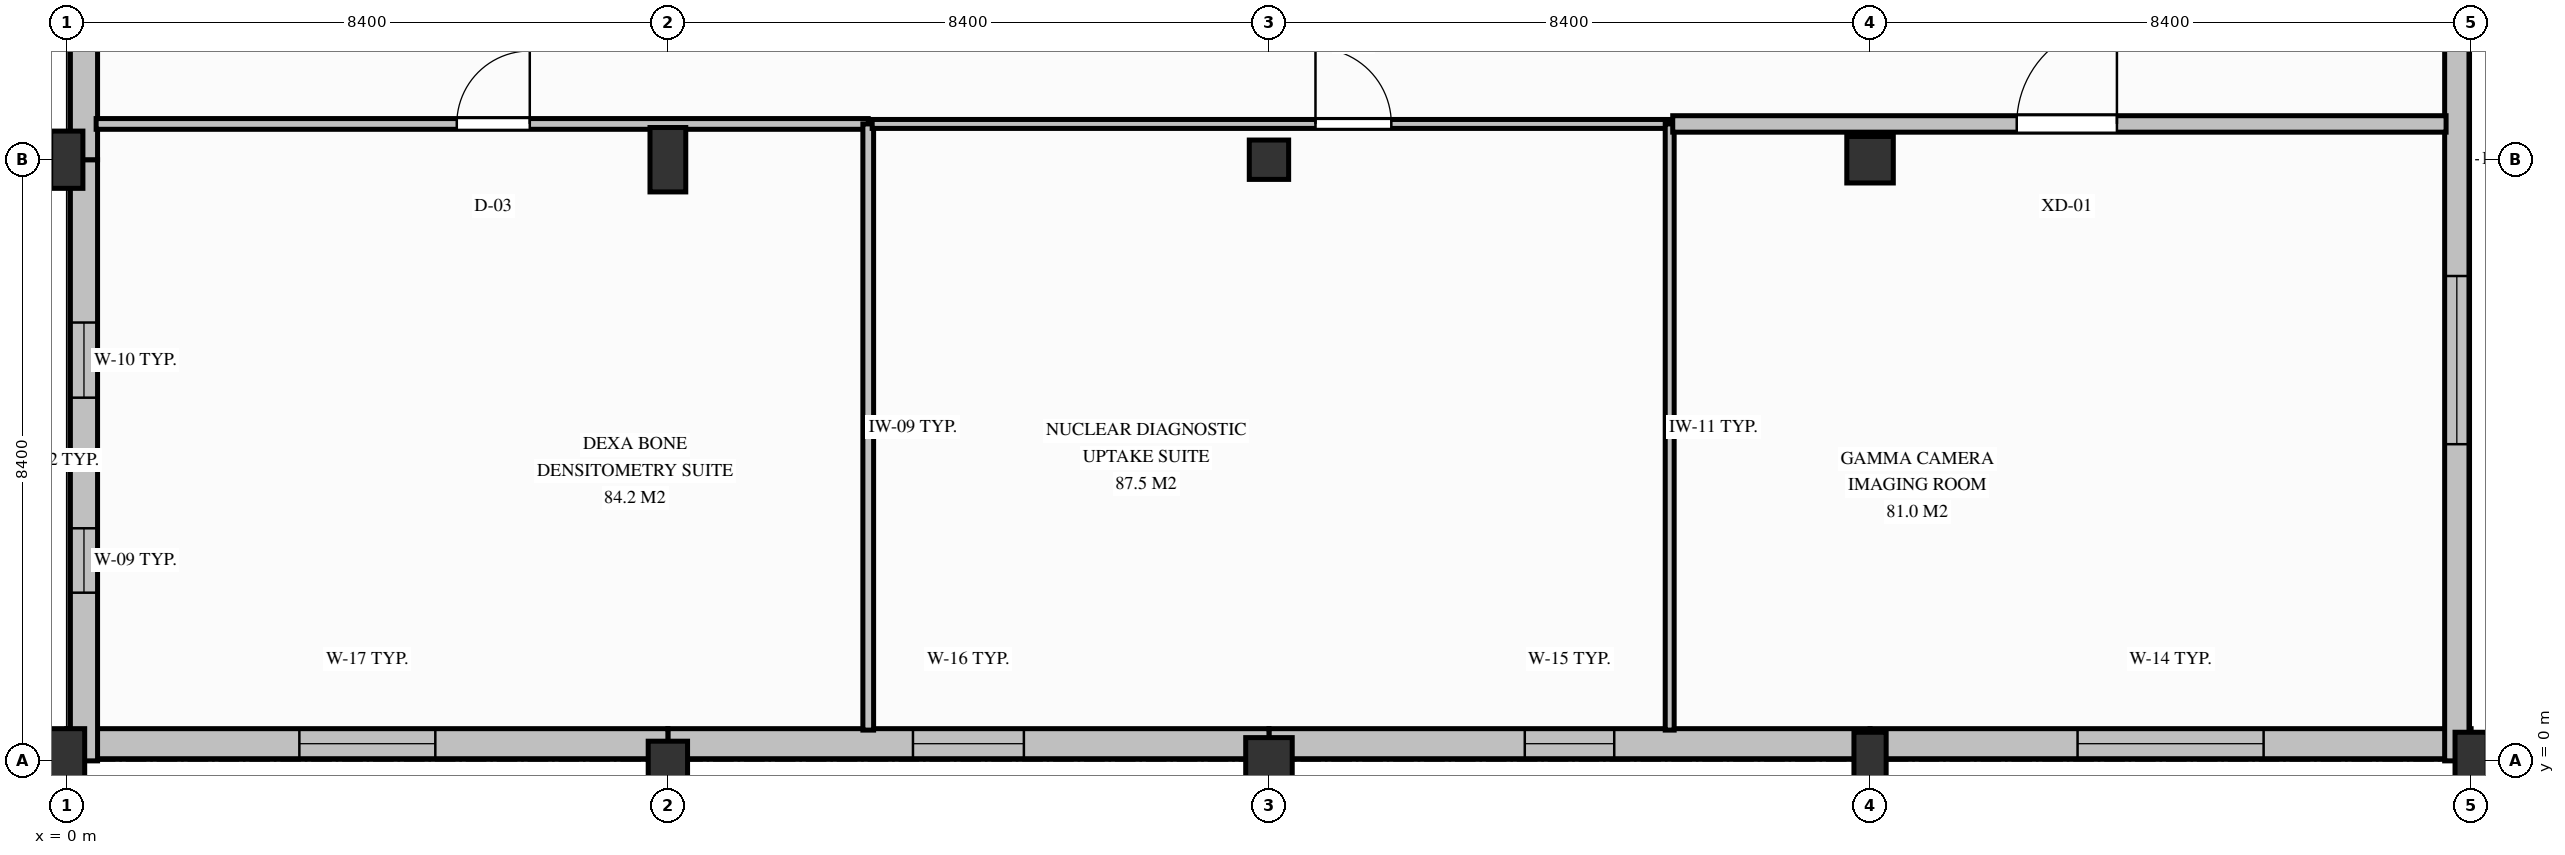
"""IFC4 building model, lengths in metres.
Left out: names, types, materials, properties, quantities, classifications, styles, units other than length and angle.
Written with IfcOpenShell. Run it as: python <this file> out.ifc"""

import sys

from ifc_helpers import new_model, si_unit, direction, frame, frame_2d, origin, origin_with_axes, origin_2d, place, context, subcontext, project, spatial, rectangle, circle, extrude, element, fill, save


model = new_model("IFC4")
c1 = context("Model", 3, precision=1e-05, world=origin(), true_north=direction((0.0, 1.0)))
c2 = subcontext(c1, "Body", "Model", "MODEL_VIEW")
j1 = project(units=[si_unit("LENGTHUNIT", "METRE"), si_unit("PLANEANGLEUNIT", "RADIAN")], contexts=[c1])
p1 = place(None, origin())
s1 = spatial("IfcSite", under=j1, at=p1, CompositionType="ELEMENT")
p2 = place(p1, origin())
s2 = spatial("IfcBuilding", under=s1, at=p2, CompositionType="ELEMENT")
p3 = place(p2, frame((0.0, 0.0, 9.0)))
s3 = spatial("IfcBuildingStorey", under=s2, at=p3, CompositionType="ELEMENT", Elevation=9.0)
p4 = place(p3, origin_with_axes())
e1 = element("IfcColumn", 1, at=p4, inside=s3, PredefinedType="COLUMN", context=c2, shape_type="SweptSolid", body=[
    extrude(rectangle(XDim=0.5, YDim=0.9, at=origin_2d()), origin(), (0.0, 0.0, 1.0), 4.2),
])
p5 = place(p3, frame((0.0, 8.4, 0.0), z_axis=(0.0, 0.0, 1.0), x_axis=(1.0, 0.0, 0.0)))
e2 = element("IfcColumn", 2, at=p5, inside=s3, PredefinedType="COLUMN", context=c2, shape_type="SweptSolid", body=[
    extrude(rectangle(XDim=0.45, YDim=0.8, at=origin_2d()), origin(), (0.0, 0.0, 1.0), 4.2),
])
p6 = place(p3, frame((8.4, 0.0, 0.0), z_axis=(0.0, 0.0, 1.0), x_axis=(1.0, 0.0, 0.0)))
e3 = element("IfcColumn", 3, at=p6, inside=s3, PredefinedType="COLUMN", context=c2, shape_type="SweptSolid", body=[
    extrude(circle(Radius=0.275, at=origin_2d()), origin(), (0.0, 0.0, 1.0), 4.2),
])
p7 = place(p3, frame((8.4, 8.4, 0.0), z_axis=(0.0, 0.0, 1.0), x_axis=(1.0, 0.0, 0.0)))
e4 = element("IfcColumn", 4, at=p7, inside=s3, PredefinedType="COLUMN", context=c2, shape_type="SweptSolid", body=[
    extrude(rectangle(XDim=0.5, YDim=0.9, at=origin_2d()), origin(), (0.0, 0.0, 1.0), 4.2),
])
p8 = place(p3, frame((16.8, 0.0, 0.0), z_axis=(0.0, 0.0, 1.0), x_axis=(1.0, 0.0, 0.0)))
e5 = element("IfcColumn", 5, at=p8, inside=s3, PredefinedType="COLUMN", context=c2, shape_type="SweptSolid", body=[
    extrude(circle(Radius=0.325, at=origin_2d()), origin(), (0.0, 0.0, 1.0), 4.2),
])
p9 = place(p3, frame((16.8, 8.4, 0.0), z_axis=(0.0, 0.0, 1.0), x_axis=(1.0, 0.0, 0.0)))
e6 = element("IfcColumn", 6, at=p9, inside=s3, PredefinedType="COLUMN", context=c2, shape_type="SweptSolid", body=[
    extrude(circle(Radius=0.275, at=origin_2d()), origin(), (0.0, 0.0, 1.0), 4.2),
])
p10 = place(p3, frame((25.2, 0.0, 0.0), z_axis=(0.0, 0.0, 1.0), x_axis=(1.0, 0.0, 0.0)))
e7 = element("IfcColumn", 7, at=p10, inside=s3, PredefinedType="COLUMN", context=c2, shape_type="SweptSolid", body=[
    extrude(rectangle(XDim=0.45, YDim=0.8, at=origin_2d()), origin(), (0.0, 0.0, 1.0), 4.2),
])
p11 = place(p3, frame((25.2, 8.4, 0.0), z_axis=(0.0, 0.0, 1.0), x_axis=(1.0, 0.0, 0.0)))
e8 = element("IfcColumn", 8, at=p11, inside=s3, PredefinedType="COLUMN", context=c2, shape_type="SweptSolid", body=[
    extrude(circle(Radius=0.325, at=origin_2d()), origin(), (0.0, 0.0, 1.0), 4.2),
])
p12 = place(p3, frame((33.6, 0.0, 0.0), z_axis=(0.0, 0.0, 1.0), x_axis=(1.0, 0.0, 0.0)))
e9 = element("IfcColumn", 9, at=p12, inside=s3, PredefinedType="COLUMN", context=c2, shape_type="SweptSolid", body=[
    extrude(rectangle(XDim=0.45, YDim=0.8, at=origin_2d()), origin(), (0.0, 0.0, 1.0), 4.2),
])
p13 = place(p3, frame((33.6, 0.24, 0.0), z_axis=(0.0, 0.0, 1.0), x_axis=(-1.0, 0.0, 0.0)))
e10 = element("IfcWall", 10, at=p13, inside=s3, PredefinedType="SOLIDWALL", context=c2, shape_type="SweptSolid", body=[
    extrude(rectangle(XDim=8.4, YDim=0.42, at=frame_2d((4.2, 0.0))), origin(), (0.0, 0.0, 1.0), 2.568),
])
p14 = place(p13, frame((2.9, 0.0, 0.85)))
e11 = element("IfcOpeningElement", 11, at=p14, cuts=e10, PredefinedType="OPENING", context=c2, shape_type="SweptSolid", body=[
    extrude(rectangle(XDim=2.6, YDim=1.538, at=frame_2d((1.3, 0.769))), frame((0.0, 0.22, 0.0), z_axis=(0.0, -1.0, 0.0), x_axis=(1.0, 0.0, 0.0)), (0.0, 0.0, 1.0), 0.44),
])
p15 = place(p3, frame((25.2, 0.24, 0.0), z_axis=(0.0, 0.0, 1.0), x_axis=(-1.0, 0.0, 0.0)))
e12 = element("IfcWall", 12, at=p15, inside=s3, PredefinedType="SOLIDWALL", context=c2, shape_type="SweptSolid", body=[
    extrude(rectangle(XDim=8.4, YDim=0.42, at=frame_2d((4.2, 0.0))), origin(), (0.0, 0.0, 1.0), 2.568),
])
p16 = place(p15, frame((3.575, 0.0, 0.85)))
e13 = element("IfcOpeningElement", 13, at=p16, cuts=e12, PredefinedType="OPENING", context=c2, shape_type="SweptSolid", body=[
    extrude(rectangle(XDim=1.25, YDim=1.5, at=frame_2d((0.625, 0.75))), frame((0.0, 0.22, 0.0), z_axis=(0.0, -1.0, 0.0), x_axis=(1.0, 0.0, 0.0)), (0.0, 0.0, 1.0), 0.44),
])
p17 = place(p3, frame((16.8, 0.24, 0.0), z_axis=(0.0, 0.0, 1.0), x_axis=(-1.0, 0.0, 0.0)))
e14 = element("IfcWall", 14, at=p17, inside=s3, PredefinedType="SOLIDWALL", context=c2, shape_type="SweptSolid", body=[
    extrude(rectangle(XDim=8.4, YDim=0.42, at=frame_2d((4.2, 0.0))), origin(), (0.0, 0.0, 1.0), 2.568),
])
p18 = place(p17, frame((3.425, 0.0, 0.85)))
e15 = element("IfcOpeningElement", 15, at=p18, cuts=e14, PredefinedType="OPENING", context=c2, shape_type="SweptSolid", body=[
    extrude(rectangle(XDim=1.55, YDim=1.538, at=frame_2d((0.775, 0.769))), frame((0.0, 0.22, 0.0), z_axis=(0.0, -1.0, 0.0), x_axis=(1.0, 0.0, 0.0)), (0.0, 0.0, 1.0), 0.44),
])
p19 = place(p3, frame((8.4, 0.24, 0.0), z_axis=(0.0, 0.0, 1.0), x_axis=(-1.0, 0.0, 0.0)))
e16 = element("IfcWall", 16, at=p19, inside=s3, PredefinedType="SOLIDWALL", context=c2, shape_type="SweptSolid", body=[
    extrude(rectangle(XDim=8.4, YDim=0.42, at=frame_2d((4.2, 0.0))), origin(), (0.0, 0.0, 1.0), 2.568),
])
p20 = place(p19, frame((3.25, 0.0, 0.85)))
e17 = element("IfcOpeningElement", 17, at=p20, cuts=e16, PredefinedType="OPENING", context=c2, shape_type="SweptSolid", body=[
    extrude(rectangle(XDim=1.9, YDim=1.538, at=frame_2d((0.95, 0.769))), frame((0.0, 0.22, 0.0), z_axis=(0.0, -1.0, 0.0), x_axis=(1.0, 0.0, 0.0)), (0.0, 0.0, 1.0), 0.44),
])
p21 = place(p3, frame((0.24, 0.0, 0.0), z_axis=(0.0, 0.0, 1.0), x_axis=(0.0, 1.0, 0.0)))
e18 = element("IfcWall", 18, at=p21, inside=s3, PredefinedType="SOLIDWALL", context=c2, shape_type="SweptSolid", body=[
    extrude(rectangle(XDim=8.4, YDim=0.38, at=frame_2d((4.2, 0.0))), origin(), (0.0, 0.0, 1.0), 2.568),
])
p22 = place(p21, frame((2.35, 0.0, 0.85)))
e19 = element("IfcOpeningElement", 19, at=p22, cuts=e18, PredefinedType="OPENING", context=c2, shape_type="SweptSolid", body=[
    extrude(rectangle(XDim=0.9, YDim=1.538, at=frame_2d((0.45, 0.769))), frame((0.0, 0.2, 0.0), z_axis=(0.0, -1.0, 0.0), x_axis=(1.0, 0.0, 0.0)), (0.0, 0.0, 1.0), 0.4),
])
p23 = place(p21, frame((5.075, 0.0, 0.85)))
e20 = element("IfcOpeningElement", 20, at=p23, cuts=e18, PredefinedType="OPENING", context=c2, shape_type="SweptSolid", body=[
    extrude(rectangle(XDim=1.05, YDim=1.538, at=frame_2d((0.525, 0.769))), frame((0.0, 0.2, 0.0), z_axis=(0.0, -1.0, 0.0), x_axis=(1.0, 0.0, 0.0)), (0.0, 0.0, 1.0), 0.4),
])
p24 = place(p3, frame((0.24, 8.4, 0.0), z_axis=(0.0, 0.0, 1.0), x_axis=(0.0, 1.0, 0.0)))
e21 = element("IfcWall", 21, at=p24, inside=s3, PredefinedType="SOLIDWALL", context=c2, shape_type="SweptSolid", body=[
    extrude(rectangle(XDim=8.4, YDim=0.38, at=frame_2d((4.2, 0.0))), origin(), (0.0, 0.0, 1.0), 3.478),
])
p25 = place(p24, frame((2.35, 0.0, 0.85)))
e22 = element("IfcOpeningElement", 22, at=p25, cuts=e21, PredefinedType="OPENING", context=c2, shape_type="SweptSolid", body=[
    extrude(rectangle(XDim=0.9, YDim=1.8, at=frame_2d((0.45, 0.9))), frame((0.0, 0.2, 0.0), z_axis=(0.0, -1.0, 0.0), x_axis=(1.0, 0.0, 0.0)), (0.0, 0.0, 1.0), 0.4),
])
p26 = place(p24, frame((5.075, 0.0, 0.85)))
e23 = element("IfcOpeningElement", 23, at=p26, cuts=e21, PredefinedType="OPENING", context=c2, shape_type="SweptSolid", body=[
    extrude(rectangle(XDim=1.05, YDim=1.75, at=frame_2d((0.525, 0.875))), frame((0.0, 0.2, 0.0), z_axis=(0.0, -1.0, 0.0), x_axis=(1.0, 0.0, 0.0)), (0.0, 0.0, 1.0), 0.4),
])
p27 = place(p3, frame((33.4, 16.8, 0.0), z_axis=(0.0, 0.0, 1.0), x_axis=(0.0, -1.0, 0.0)))
e24 = element("IfcWall", 24, at=p27, inside=s3, PredefinedType="SOLIDWALL", context=c2, shape_type="SweptSolid", body=[
    extrude(rectangle(XDim=16.8, YDim=0.34, at=frame_2d((8.4, 0.0))), origin(), (0.0, 0.0, 1.0), 3.668),
])
p28 = place(p27, frame((4.525, 0.0, 0.85)))
e25 = element("IfcOpeningElement", 25, at=p28, cuts=e24, PredefinedType="OPENING", context=c2, shape_type="SweptSolid", body=[
    extrude(rectangle(XDim=2.15, YDim=1.75, at=frame_2d((1.075, 0.875))), frame((0.0, 0.18, 0.0), z_axis=(0.0, -1.0, 0.0), x_axis=(1.0, 0.0, 0.0)), (0.0, 0.0, 1.0), 0.36),
])
p29 = place(p27, frame((10.025, 0.0, 0.85)))
e26 = element("IfcOpeningElement", 26, at=p29, cuts=e24, PredefinedType="OPENING", context=c2, shape_type="SweptSolid", body=[
    extrude(rectangle(XDim=2.35, YDim=1.8, at=frame_2d((1.175, 0.9))), frame((0.0, 0.18, 0.0), z_axis=(0.0, -1.0, 0.0), x_axis=(1.0, 0.0, 0.0)), (0.0, 0.0, 1.0), 0.36),
])
p30 = place(p3, frame((0.41, 8.9, 0.0), z_axis=(0.0, 0.0, 1.0), x_axis=(1.0, 0.0, 0.0)))
e27 = element("IfcWall", 27, at=p30, inside=s3, PredefinedType="PARTITIONING", context=c2, shape_type="SweptSolid", body=[
    extrude(rectangle(XDim=10.79, YDim=0.15, at=frame_2d((5.395, 0.0))), origin(), (0.0, 0.0, 1.0), 3.578),
])
p31 = place(p30, frame((5.04, 0.0, 0.0)))
e28 = element("IfcOpeningElement", 28, at=p31, cuts=e27, PredefinedType="OPENING", context=c2, shape_type="SweptSolid", body=[
    extrude(rectangle(XDim=1.02, YDim=2.15, at=frame_2d((0.51, 1.075))), frame((0.0, 0.085, 0.0), z_axis=(0.0, -1.0, 0.0), x_axis=(1.0, 0.0, 0.0)), (0.0, 0.0, 1.0), 0.17),
])
p32 = place(p3, frame((11.2, 8.9, 0.0), z_axis=(0.0, 0.0, 1.0), x_axis=(0.0, -1.0, 0.0)))
e29 = element("IfcWall", 29, at=p32, inside=s3, PredefinedType="PARTITIONING", context=c2, shape_type="SweptSolid", body=[
    extrude(rectangle(XDim=8.47, YDim=0.15, at=frame_2d((4.235, 0.0))), origin(), (0.0, 0.0, 1.0), 3.528),
])
p33 = place(p3, frame((11.255, 8.9, 0.0), z_axis=(0.0, 0.0, 1.0), x_axis=(1.0, 0.0, 0.0)))
e30 = element("IfcWall", 30, at=p33, inside=s3, PredefinedType="PARTITIONING", context=c2, shape_type="SweptSolid", body=[
    extrude(rectangle(XDim=11.145, YDim=0.125, at=frame_2d((5.573, 0.0))), origin(), (0.0, 0.0, 1.0), 3.468),
])
p34 = place(p33, frame((6.195, 0.0, 0.0)))
e31 = element("IfcOpeningElement", 31, at=p34, cuts=e30, PredefinedType="OPENING", context=c2, shape_type="SweptSolid", body=[
    extrude(rectangle(XDim=1.06, YDim=2.16, at=frame_2d((0.53, 1.08))), frame((0.0, 0.073, 0.0), z_axis=(0.0, -1.0, 0.0), x_axis=(1.0, 0.0, 0.0)), (0.0, 0.0, 1.0), 0.145),
])
p35 = place(p3, frame((22.4, 8.9, 0.0), z_axis=(0.0, 0.0, 1.0), x_axis=(0.0, -1.0, 0.0)))
e32 = element("IfcWall", 32, at=p35, inside=s3, PredefinedType="PARTITIONING", context=c2, shape_type="SweptSolid", body=[
    extrude(rectangle(XDim=8.47, YDim=0.125, at=frame_2d((4.235, 0.0))), origin(), (0.0, 0.0, 1.0), 3.588),
])
p36 = place(p3, frame((22.442, 8.9, 0.0), z_axis=(0.0, 0.0, 1.0), x_axis=(1.0, 0.0, 0.0)))
e33 = element("IfcWall", 33, at=p36, inside=s3, PredefinedType="PARTITIONING", context=c2, shape_type="SweptSolid", body=[
    extrude(rectangle(XDim=10.808, YDim=0.23, at=frame_2d((5.404, 0.0))), origin(), (0.0, 0.0, 1.0), 3.368),
])
p37 = place(p36, frame((4.808, 0.0, 0.0)))
e34 = element("IfcOpeningElement", 34, at=p37, cuts=e33, PredefinedType="OPENING", context=c2, shape_type="SweptSolid", body=[
    extrude(rectangle(XDim=1.4, YDim=2.2, at=frame_2d((0.7, 1.1))), frame((0.0, 0.125, 0.0), z_axis=(0.0, -1.0, 0.0), x_axis=(1.0, 0.0, 0.0)), (0.0, 0.0, 1.0), 0.25),
])
p38 = place(p14, origin())
e35 = element("IfcWindow", 35, at=p38, inside=s3, PartitioningType="SINGLE_PANEL", PredefinedType="WINDOW", context=c2, shape_type="SweptSolid", body=[
    extrude(rectangle(XDim=2.6, YDim=1.538, at=frame_2d((1.3, 0.769))), frame((0.0, 0.03, 0.0), z_axis=(0.0, -1.0, 0.0), x_axis=(1.0, 0.0, 0.0)), (0.0, 0.0, 1.0), 0.06),
])
fill(e11, e35)
p39 = place(p16, origin())
e36 = element("IfcWindow", 36, at=p39, inside=s3, PartitioningType="SINGLE_PANEL", PredefinedType="WINDOW", context=c2, shape_type="SweptSolid", body=[
    extrude(rectangle(XDim=1.25, YDim=1.5, at=frame_2d((0.625, 0.75))), frame((0.0, 0.03, 0.0), z_axis=(0.0, -1.0, 0.0), x_axis=(1.0, 0.0, 0.0)), (0.0, 0.0, 1.0), 0.06),
])
fill(e13, e36)
p40 = place(p18, origin())
e37 = element("IfcWindow", 37, at=p40, inside=s3, PartitioningType="SINGLE_PANEL", PredefinedType="WINDOW", context=c2, shape_type="SweptSolid", body=[
    extrude(rectangle(XDim=1.55, YDim=1.538, at=frame_2d((0.775, 0.769))), frame((0.0, 0.03, 0.0), z_axis=(0.0, -1.0, 0.0), x_axis=(1.0, 0.0, 0.0)), (0.0, 0.0, 1.0), 0.06),
])
fill(e15, e37)
p41 = place(p20, origin())
e38 = element("IfcWindow", 38, at=p41, inside=s3, PartitioningType="SINGLE_PANEL", PredefinedType="WINDOW", context=c2, shape_type="SweptSolid", body=[
    extrude(rectangle(XDim=1.9, YDim=1.538, at=frame_2d((0.95, 0.769))), frame((0.0, 0.03, 0.0), z_axis=(0.0, -1.0, 0.0), x_axis=(1.0, 0.0, 0.0)), (0.0, 0.0, 1.0), 0.06),
])
fill(e17, e38)
p42 = place(p22, origin())
e39 = element("IfcWindow", 39, at=p42, inside=s3, PartitioningType="SINGLE_PANEL", PredefinedType="WINDOW", context=c2, shape_type="SweptSolid", body=[
    extrude(rectangle(XDim=0.9, YDim=1.538, at=frame_2d((0.45, 0.769))), frame((0.0, 0.03, 0.0), z_axis=(0.0, -1.0, 0.0), x_axis=(1.0, 0.0, 0.0)), (0.0, 0.0, 1.0), 0.06),
])
fill(e19, e39)
p43 = place(p23, origin())
e40 = element("IfcWindow", 40, at=p43, inside=s3, PartitioningType="SINGLE_PANEL", PredefinedType="WINDOW", context=c2, shape_type="SweptSolid", body=[
    extrude(rectangle(XDim=1.05, YDim=1.538, at=frame_2d((0.525, 0.769))), frame((0.0, 0.03, 0.0), z_axis=(0.0, -1.0, 0.0), x_axis=(1.0, 0.0, 0.0)), (0.0, 0.0, 1.0), 0.06),
])
fill(e20, e40)
p44 = place(p29, origin())
e41 = element("IfcWindow", 41, at=p44, inside=s3, PartitioningType="SINGLE_PANEL", PredefinedType="WINDOW", context=c2, shape_type="SweptSolid", body=[
    extrude(rectangle(XDim=2.35, YDim=1.8, at=frame_2d((1.175, 0.9))), frame((0.0, 0.03, 0.0), z_axis=(0.0, -1.0, 0.0), x_axis=(1.0, 0.0, 0.0)), (0.0, 0.0, 1.0), 0.06),
])
fill(e26, e41)
p45 = place(p31, origin())
e42 = element("IfcDoor", 42, at=p45, inside=s3, OperationType="SINGLE_SWING_RIGHT", PredefinedType="DOOR", context=c2, shape_type="SweptSolid", body=[
    extrude(rectangle(XDim=1.02, YDim=2.15, at=frame_2d((0.51, 1.075))), frame((0.0, 0.025, 0.0), z_axis=(0.0, -1.0, 0.0), x_axis=(1.0, 0.0, 0.0)), (0.0, 0.0, 1.0), 0.05),
])
fill(e28, e42)
p46 = place(p34, origin())
e43 = element("IfcDoor", 43, at=p46, inside=s3, OperationType="SINGLE_SWING_LEFT", PredefinedType="DOOR", context=c2, shape_type="SweptSolid", body=[
    extrude(rectangle(XDim=1.06, YDim=2.16, at=frame_2d((0.53, 1.08))), frame((0.0, 0.025, 0.0), z_axis=(0.0, -1.0, 0.0), x_axis=(1.0, 0.0, 0.0)), (0.0, 0.0, 1.0), 0.05),
])
fill(e31, e43)
p47 = place(p37, origin())
e44 = element("IfcDoor", 44, at=p47, inside=s3, OperationType="SINGLE_SWING_RIGHT", PredefinedType="DOOR", context=c2, shape_type="SweptSolid", body=[
    extrude(rectangle(XDim=1.4, YDim=2.2, at=frame_2d((0.7, 1.1))), frame((0.0, 0.025, 0.0), z_axis=(0.0, -1.0, 0.0), x_axis=(1.0, 0.0, 0.0)), (0.0, 0.0, 1.0), 0.05),
])
fill(e34, e44)
save(model, sys.argv[1])
